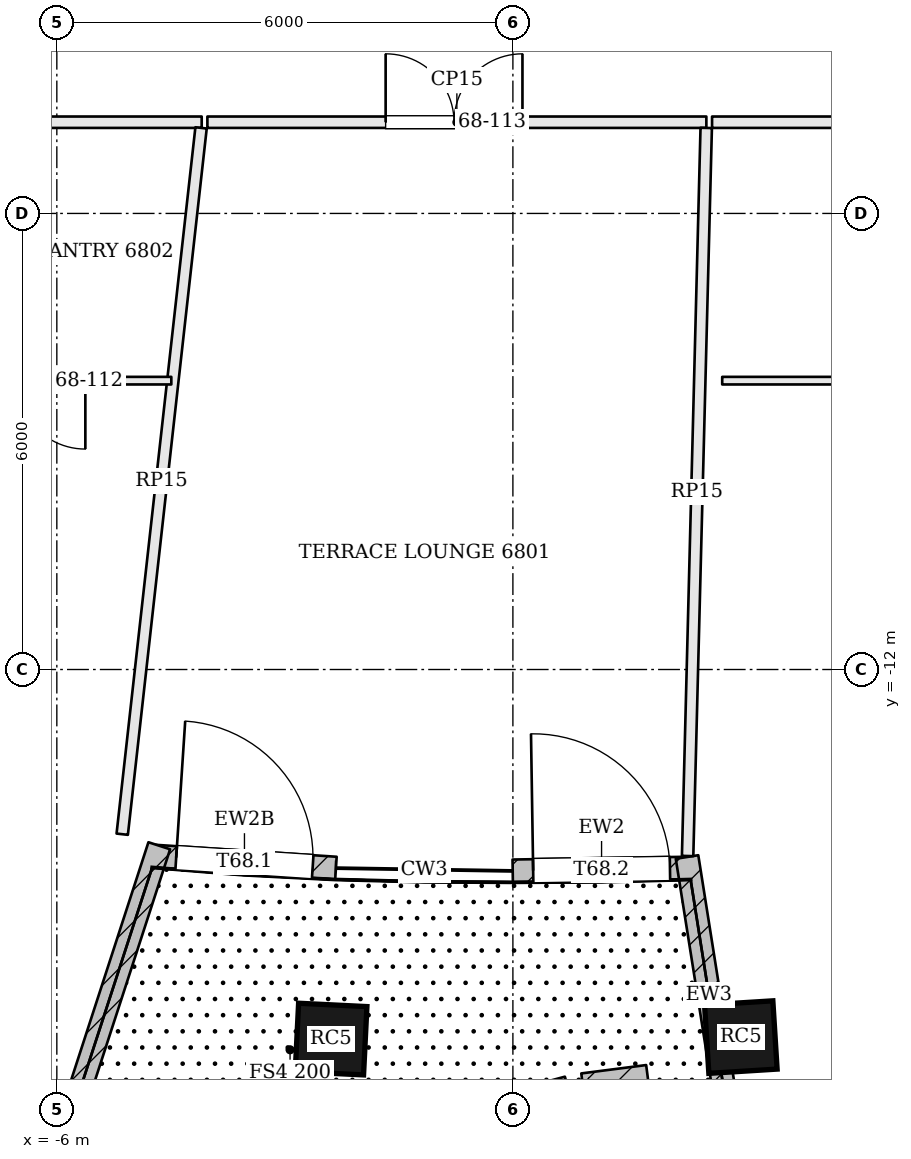
"""IFC4 building model, lengths in metres.
Left out: names, types, materials, properties, quantities, classifications, styles, units other than length and angle.
Written with IfcOpenShell. Run it as: python <this file> out.ifc"""

import sys

from ifc_helpers import new_model, si_unit, direction, frame, frame_2d, origin, origin_2d, place, context, subcontext, project, spatial, rectangle, extrude, element, fill, save


model = new_model("IFC4")
c1 = context("Model", 3, precision=1e-05, world=origin(), true_north=direction((0.0, 1.0)))
c2 = subcontext(c1, "Body", "Model", "MODEL_VIEW")
j1 = project(units=[si_unit("LENGTHUNIT", "METRE"), si_unit("PLANEANGLEUNIT", "RADIAN")], contexts=[c1])
p1 = place(None, origin())
s1 = spatial("IfcSite", under=j1, at=p1, CompositionType="ELEMENT")
p2 = place(p1, origin())
s2 = spatial("IfcBuilding", under=s1, at=p2, CompositionType="ELEMENT")
p3 = place(p2, frame((0.0, 0.0, 276.6)))
s3 = spatial("IfcBuildingStorey", under=s2, at=p3, CompositionType="ELEMENT", Elevation=276.6)
for number, where, z_axis, x_axis in (
    (1, (-2.392, -16.862, 0.0), (0.0, 0.0, 1.0), (0.999, -0.049, 0.0)),
    (2, (2.999, -16.836, 0.0), (0.0, 0.0, 1.0), (0.998, 0.062, 0.0)),
):
    element("IfcColumn", number, at=place(p3, frame(where, z_axis=z_axis, x_axis=x_axis)), inside=s3, PredefinedType="COLUMN", context=c2, shape_type="SweptSolid", body=[
        extrude(rectangle(XDim=0.9, YDim=0.9, at=origin_2d()), origin(), (0.0, 0.0, 1.0), 3.9),
    ])
p4 = place(p3, frame((-4.735, -14.454, 0.0), z_axis=(0.0, 0.0, 1.0), x_axis=(0.997827054151, -0.065887555761, 0.0)))
e3 = element("IfcWall", 3, at=p4, inside=s3, PredefinedType="SOLIDWALL", context=c2, shape_type="SweptSolid", body=[
    extrude(rectangle(XDim=2.412, YDim=0.3, at=frame_2d((1.206, 0.0))), origin(), (0.0, 0.0, 1.0), 3.218),
])
p5 = place(p4, frame((0.306, 0.0, 0.0)))
e4 = element("IfcOpeningElement", 4, at=p5, cuts=e3, PredefinedType="OPENING", context=c2, shape_type="SweptSolid", body=[
    extrude(rectangle(XDim=1.8, YDim=2.4, at=frame_2d((0.9, 1.2))), frame((0.0, 0.16, 0.0), z_axis=(0.0, -1.0, 0.0), x_axis=(1.0, 0.0, 0.0)), (0.0, 0.0, 1.0), 0.32),
])
p6 = place(p3, frame((-0.002, -14.65, 0.0), z_axis=(0.0, 0.0, 1.0), x_axis=(0.999875724946, 0.015764982193, 0.0)))
e5 = element("IfcWall", 5, at=p6, inside=s3, PredefinedType="SOLIDWALL", context=c2, shape_type="SweptSolid", body=[
    extrude(rectangle(XDim=2.338, YDim=0.3, at=frame_2d((1.169, 0.0))), origin(), (0.0, 0.0, 1.0), 3.7),
])
p7 = place(p6, frame((0.269, 0.0, 0.0)))
e6 = element("IfcOpeningElement", 6, at=p7, cuts=e5, PredefinedType="OPENING", context=c2, shape_type="SweptSolid", body=[
    extrude(rectangle(XDim=1.8, YDim=2.4, at=frame_2d((0.9, 1.2))), frame((0.0, 0.16, 0.0), z_axis=(0.0, -1.0, 0.0), x_axis=(1.0, 0.0, 0.0)), (0.0, 0.0, 1.0), 0.32),
])
p8 = place(p3, frame((-6.899, -21.233, 0.0), z_axis=(0.0, 0.0, 1.0), x_axis=(0.309015453865, 0.951057016836, 0.0)))
e7 = element("IfcWall", 7, at=p8, inside=s3, PredefinedType="SOLIDWALL", context=c2, shape_type="SweptSolid", body=[
    extrude(rectangle(XDim=7.27, YDim=0.3, at=frame_2d((3.635, 0.0))), origin(), (0.0, 0.0, 1.0), 3.254),
])
p9 = place(p3, frame((2.867, -18.1, 0.0), z_axis=(0.0, 0.0, 1.0), x_axis=(-0.156558948126, 0.98766861637, 0.0)))
e8 = element("IfcWall", 8, at=p9, inside=s3, PredefinedType="SOLIDWALL", context=c2, shape_type="SweptSolid", body=[
    extrude(rectangle(XDim=3.679, YDim=0.3, at=frame_2d((1.839, 0.0))), origin(), (0.0, 0.0, 1.0), 3.254),
])
p10 = place(p3, frame((-0.105, -17.88, 0.0), z_axis=(0.0, 0.0, 1.0), x_axis=(0.965537021883, 0.260265747598, 0.0)))
e9 = element("IfcWall", 9, at=p10, inside=s3, PredefinedType="SOLIDWALL", context=c2, shape_type="SweptSolid", body=[
    extrude(rectangle(XDim=0.899, YDim=0.6, at=frame_2d((0.449, 0.0))), origin(), (0.0, 0.0, 1.0), 0.6),
])
p11 = place(p3, frame((0.938, -17.612, 0.0), z_axis=(0.0, 0.0, 1.0), x_axis=(0.991754634717, 0.128151256401, 0.0)))
e10 = element("IfcWall", 10, at=p11, inside=s3, PredefinedType="SOLIDWALL", context=c2, shape_type="SweptSolid", body=[
    extrude(rectangle(XDim=0.861, YDim=0.6, at=frame_2d((0.431, 0.0))), origin(), (0.0, 0.0, 1.0), 0.6),
])
p12 = place(p3, frame((-14.725, -4.8, 0.0), z_axis=(0.0, 0.0, 1.0), x_axis=(1.0, 0.0, 0.0)))
e11 = element("IfcWall", 11, at=p12, inside=s3, PredefinedType="PARTITIONING", context=c2, shape_type="SweptSolid", body=[
    extrude(rectangle(XDim=10.631, YDim=0.15, at=frame_2d((5.315, 0.0))), origin(), (0.0, 0.0, 1.0), 3.198),
])
p13 = place(p12, frame((0.43, 0.0, 0.0)))
e12 = element("IfcOpeningElement", 12, at=p13, cuts=e11, PredefinedType="OPENING", context=c2, shape_type="SweptSolid", body=[
    extrude(rectangle(XDim=1.0, YDim=2.1, at=frame_2d((0.5, 1.05))), frame((0.0, 0.085, 0.0), z_axis=(0.0, -1.0, 0.0), x_axis=(1.0, 0.0, 0.0)), (0.0, 0.0, 1.0), 0.17),
])
p14 = place(p12, frame((3.435, 0.0, 0.0)))
e13 = element("IfcOpeningElement", 13, at=p14, cuts=e11, PredefinedType="OPENING", context=c2, shape_type="SweptSolid", body=[
    extrude(rectangle(XDim=1.0, YDim=2.4, at=frame_2d((0.5, 1.2))), frame((0.0, 0.085, 0.0), z_axis=(0.0, -1.0, 0.0), x_axis=(1.0, 0.0, 0.0)), (0.0, 0.0, 1.0), 0.17),
])
p15 = place(p12, frame((6.015, 0.0, 0.0)))
e14 = element("IfcOpeningElement", 14, at=p15, cuts=e11, PredefinedType="OPENING", context=c2, shape_type="SweptSolid", body=[
    extrude(rectangle(XDim=1.0, YDim=2.4, at=frame_2d((0.5, 1.2))), frame((0.0, 0.085, 0.0), z_axis=(0.0, -1.0, 0.0), x_axis=(1.0, 0.0, 0.0)), (0.0, 0.0, 1.0), 0.17),
])
p16 = place(p3, frame((-5.14, -14.167, 0.0), z_axis=(0.0, 0.0, 1.0), x_axis=(0.110921580609, 0.993829161856, 0.0)))
e15 = element("IfcWall", 15, at=p16, inside=s3, PredefinedType="PARTITIONING", context=c2, shape_type="SweptSolid", body=[
    extrude(rectangle(XDim=9.35, YDim=0.15, at=frame_2d((4.675, 0.0))), origin(), (0.0, 0.0, 1.0), 3.184),
])
p17 = place(p3, frame((-4.019, -4.8, 0.0), z_axis=(0.0, 0.0, 1.0), x_axis=(1.0, 0.0, 0.0)))
e16 = element("IfcWall", 16, at=p17, inside=s3, PredefinedType="PARTITIONING", context=c2, shape_type="SweptSolid", body=[
    extrude(rectangle(XDim=6.565, YDim=0.15, at=frame_2d((3.282, 0.0))), origin(), (0.0, 0.0, 1.0), 3.198),
])
p18 = place(p17, frame((2.345, 0.0, 0.0)))
e17 = element("IfcOpeningElement", 17, at=p18, cuts=e16, PredefinedType="OPENING", context=c2, shape_type="SweptSolid", body=[
    extrude(rectangle(XDim=1.8, YDim=2.1, at=frame_2d((0.9, 1.05))), frame((0.0, 0.085, 0.0), z_axis=(0.0, -1.0, 0.0), x_axis=(1.0, 0.0, 0.0)), (0.0, 0.0, 1.0), 0.17),
])
p19 = place(p3, frame((2.299, -14.454, 0.0), z_axis=(0.0, 0.0, 1.0), x_axis=(0.025556211624, 0.999673386686, 0.0)))
e18 = element("IfcWall", 18, at=p19, inside=s3, PredefinedType="PARTITIONING", context=c2, shape_type="SweptSolid", body=[
    extrude(rectangle(XDim=9.582, YDim=0.15, at=frame_2d((4.791, 0.0))), origin(), (0.0, 0.0, 1.0), 3.184),
])
p20 = place(p3, frame((2.62, -4.8, 0.0), z_axis=(0.0, 0.0, 1.0), x_axis=(1.0, 0.0, 0.0)))
e19 = element("IfcWall", 19, at=p20, inside=s3, PredefinedType="PARTITIONING", context=c2, shape_type="SweptSolid", body=[
    extrude(rectangle(XDim=12.18, YDim=0.15, at=frame_2d((6.09, 0.0))), origin(), (0.0, 0.0, 1.0), 3.198),
])
p21 = place(p20, frame((2.792, 0.0, 0.0)))
e20 = element("IfcOpeningElement", 20, at=p21, cuts=e19, PredefinedType="OPENING", context=c2, shape_type="SweptSolid", body=[
    extrude(rectangle(XDim=1.8, YDim=2.1, at=frame_2d((0.9, 1.05))), frame((0.0, 0.085, 0.0), z_axis=(0.0, -1.0, 0.0), x_axis=(1.0, 0.0, 0.0)), (0.0, 0.0, 1.0), 0.17),
])
p22 = place(p20, frame((9.813, 0.0, 0.0)))
e21 = element("IfcOpeningElement", 21, at=p22, cuts=e19, PredefinedType="OPENING", context=c2, shape_type="SweptSolid", body=[
    extrude(rectangle(XDim=1.0, YDim=2.4, at=frame_2d((0.5, 1.2))), frame((0.0, 0.085, 0.0), z_axis=(0.0, -1.0, 0.0), x_axis=(1.0, 0.0, 0.0)), (0.0, 0.0, 1.0), 0.17),
])
p23 = place(p3, frame((-4.494, -8.2, 0.0), z_axis=(0.0, 0.0, 1.0), x_axis=(-1.0, 0.0, 0.0)))
e22 = element("IfcWall", 22, at=p23, inside=s3, PredefinedType="PARTITIONING", context=c2, shape_type="SweptSolid", body=[
    extrude(rectangle(XDim=13.656, YDim=0.1, at=frame_2d((6.828, 0.0))), origin(), (0.0, 0.0, 1.0), 3.184),
])
p24 = place(p23, frame((1.131, 0.0, 0.0)))
e23 = element("IfcOpeningElement", 23, at=p24, cuts=e22, PredefinedType="OPENING", context=c2, shape_type="SweptSolid", body=[
    extrude(rectangle(XDim=0.9, YDim=2.1, at=frame_2d((0.45, 1.05))), frame((0.0, 0.06, 0.0), z_axis=(0.0, -1.0, 0.0), x_axis=(1.0, 0.0, 0.0)), (0.0, 0.0, 1.0), 0.12),
])
p25 = place(p3, frame((18.15, -8.2, 0.0), z_axis=(0.0, 0.0, 1.0), x_axis=(-1.0, 0.0, 0.0)))
e24 = element("IfcWall", 24, at=p25, inside=s3, PredefinedType="PARTITIONING", context=c2, shape_type="SweptSolid", body=[
    extrude(rectangle(XDim=15.396, YDim=0.1, at=frame_2d((7.698, 0.0))), origin(), (0.0, 0.0, 1.0), 3.184),
])
p26 = place(p25, frame((10.833, 0.0, 0.0)))
e25 = element("IfcOpeningElement", 25, at=p26, cuts=e24, PredefinedType="OPENING", context=c2, shape_type="SweptSolid", body=[
    extrude(rectangle(XDim=1.0, YDim=2.1, at=frame_2d((0.5, 1.05))), frame((0.0, 0.06, 0.0), z_axis=(0.0, -1.0, 0.0), x_axis=(1.0, 0.0, 0.0)), (0.0, 0.0, 1.0), 0.12),
])
p27 = place(p5, origin())
e26 = element("IfcDoor", 26, at=p27, inside=s3, OperationType="DOUBLE_DOOR_DOUBLE_SWING", PredefinedType="DOOR", context=c2, shape_type="SweptSolid", body=[
    extrude(rectangle(XDim=1.8, YDim=2.4, at=frame_2d((0.9, 1.2))), frame((0.0, 0.025, 0.0), z_axis=(0.0, -1.0, 0.0), x_axis=(1.0, 0.0, 0.0)), (0.0, 0.0, 1.0), 0.05),
])
fill(e4, e26)
p28 = place(p7, origin())
e27 = element("IfcDoor", 27, at=p28, inside=s3, OperationType="DOUBLE_DOOR_DOUBLE_SWING", PredefinedType="DOOR", context=c2, shape_type="SweptSolid", body=[
    extrude(rectangle(XDim=1.8, YDim=2.4, at=frame_2d((0.9, 1.2))), frame((0.0, 0.025, 0.0), z_axis=(0.0, -1.0, 0.0), x_axis=(1.0, 0.0, 0.0)), (0.0, 0.0, 1.0), 0.05),
])
fill(e6, e27)
p29 = place(p24, origin())
e28 = element("IfcDoor", 28, at=p29, inside=s3, OperationType="SINGLE_SWING_LEFT", PredefinedType="DOOR", context=c2, shape_type="SweptSolid", body=[
    extrude(rectangle(XDim=0.9, YDim=2.1, at=frame_2d((0.45, 1.05))), frame((0.0, 0.025, 0.0), z_axis=(0.0, -1.0, 0.0), x_axis=(1.0, 0.0, 0.0)), (0.0, 0.0, 1.0), 0.05),
])
fill(e23, e28)
p30 = place(p18, origin())
e29 = element("IfcDoor", 29, at=p30, inside=s3, OperationType="DOUBLE_DOOR_SINGLE_SWING", PredefinedType="DOOR", context=c2, shape_type="SweptSolid", body=[
    extrude(rectangle(XDim=1.8, YDim=2.1, at=frame_2d((0.9, 1.05))), frame((0.0, 0.025, 0.0), z_axis=(0.0, -1.0, 0.0), x_axis=(1.0, 0.0, 0.0)), (0.0, 0.0, 1.0), 0.05),
])
fill(e17, e29)
save(model, sys.argv[1])
